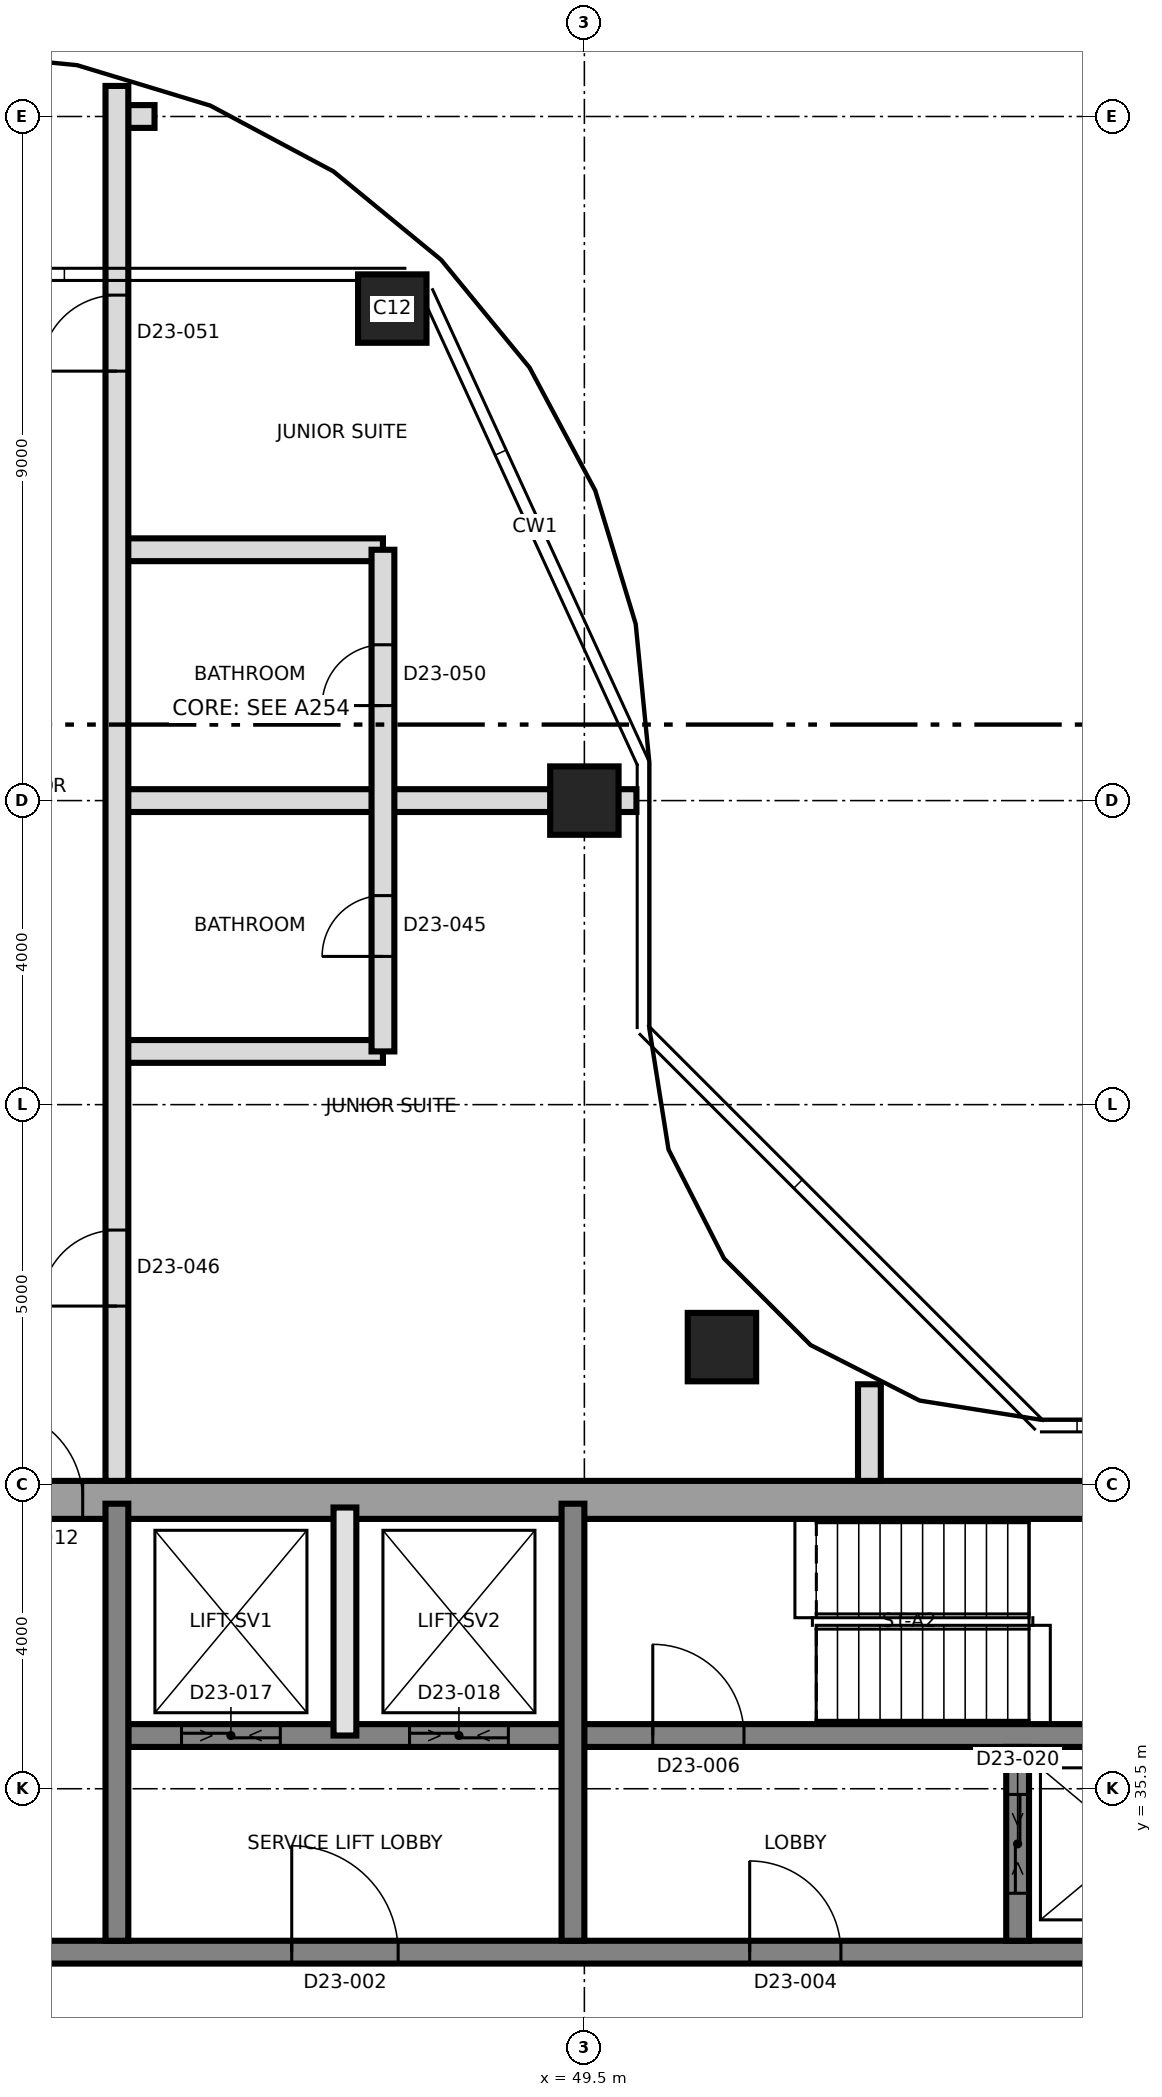
"""IFC4 building model, lengths in metres.
Left out: names, types, materials, properties, quantities, classifications, styles, units other than length and angle.
Written with IfcOpenShell. Run it as: python <this file> out.ifc"""

import sys

from ifc_helpers import new_model, si_unit, direction, frame, frame_2d, origin, origin_2d, place, context, subcontext, project, spatial, rectangle, extrude, element, fill, save


model = new_model("IFC4")
c1 = context("Model", 3, precision=1e-05, world=origin(), true_north=direction((0.0, 1.0)))
c2 = subcontext(c1, "Body", "Model", "MODEL_VIEW")
j1 = project(units=[si_unit("LENGTHUNIT", "METRE"), si_unit("PLANEANGLEUNIT", "RADIAN")], contexts=[c1])
p1 = place(None, origin())
s1 = spatial("IfcSite", under=j1, at=p1, CompositionType="ELEMENT")
p2 = place(p1, origin())
s2 = spatial("IfcBuilding", under=s1, at=p2, CompositionType="ELEMENT")
p3 = place(p2, frame((0.0, 0.0, 206.9)))
s3 = spatial("IfcBuildingStorey", under=s2, at=p3, CompositionType="ELEMENT", Elevation=206.9)
p4 = place(p3, frame((31.25, 39.3, 0.0), z_axis=(0.0, 0.0, 1.0), x_axis=(1.0, 0.0, 0.0)))
e1 = element("IfcWall", 1, at=p4, inside=s3, PredefinedType="SHEAR", context=c2, shape_type="SweptSolid", body=[
    extrude(rectangle(XDim=27.0, YDim=0.5, at=frame_2d((13.5, 0.0))), origin(), (0.0, 0.0, 1.0), 3.7),
])
p5 = place(p4, frame((10.45, 0.0, 0.0)))
e2 = element("IfcOpeningElement", 2, at=p5, cuts=e1, PredefinedType="OPENING", context=c2, shape_type="SweptSolid", body=[
    extrude(rectangle(XDim=1.2, YDim=2.1, at=frame_2d((0.6, 1.05))), frame((0.0, 0.26, 0.0), z_axis=(0.0, -1.0, 0.0), x_axis=(1.0, 0.0, 0.0)), (0.0, 0.0, 1.0), 0.52),
])
p6 = place(p3, frame((31.75, 33.35, 0.0), z_axis=(0.0, 0.0, 1.0), x_axis=(1.0, 0.0, 0.0)))
e3 = element("IfcWall", 3, at=p6, inside=s3, PredefinedType="SHEAR", context=c2, shape_type="SweptSolid", body=[
    extrude(rectangle(XDim=26.5, YDim=0.3, at=frame_2d((13.25, 0.0))), origin(), (0.0, 0.0, 1.0), 3.7),
])
p7 = place(p6, frame((13.9, 0.0, 0.0)))
e4 = element("IfcOpeningElement", 4, at=p7, cuts=e3, PredefinedType="OPENING", context=c2, shape_type="SweptSolid", body=[
    extrude(rectangle(XDim=1.4, YDim=2.1, at=frame_2d((0.7, 1.05))), frame((0.0, 0.16, 0.0), z_axis=(0.0, -1.0, 0.0), x_axis=(1.0, 0.0, 0.0)), (0.0, 0.0, 1.0), 0.32),
])
p8 = place(p6, frame((5.375, 0.0, 0.0)))
e5 = element("IfcOpeningElement", 5, at=p8, cuts=e3, PredefinedType="OPENING", context=c2, shape_type="SweptSolid", body=[
    extrude(rectangle(XDim=1.2, YDim=2.1, at=frame_2d((0.6, 1.05))), frame((0.0, 0.16, 0.0), z_axis=(0.0, -1.0, 0.0), x_axis=(1.0, 0.0, 0.0)), (0.0, 0.0, 1.0), 0.32),
])
p9 = place(p6, frame((19.925, 0.0, 0.0)))
e6 = element("IfcOpeningElement", 6, at=p9, cuts=e3, PredefinedType="OPENING", context=c2, shape_type="SweptSolid", body=[
    extrude(rectangle(XDim=1.2, YDim=2.1, at=frame_2d((0.6, 1.05))), frame((0.0, 0.16, 0.0), z_axis=(0.0, -1.0, 0.0), x_axis=(1.0, 0.0, 0.0)), (0.0, 0.0, 1.0), 0.32),
])
p10 = place(p3, frame((43.5, 36.2, 0.0), z_axis=(0.0, 0.0, 1.0), x_axis=(1.0, 0.0, 0.0)))
e7 = element("IfcWall", 7, at=p10, inside=s3, PredefinedType="SHEAR", context=c2, shape_type="SweptSolid", body=[
    extrude(rectangle(XDim=14.75, YDim=0.3, at=frame_2d((7.375, 0.0))), origin(), (0.0, 0.0, 1.0), 3.7),
])
p11 = place(p10, frame((6.9, 0.0, 0.0)))
e8 = element("IfcOpeningElement", 8, at=p11, cuts=e7, PredefinedType="OPENING", context=c2, shape_type="SweptSolid", body=[
    extrude(rectangle(XDim=1.2, YDim=2.1, at=frame_2d((0.6, 1.05))), frame((0.0, 0.16, 0.0), z_axis=(0.0, -1.0, 0.0), x_axis=(1.0, 0.0, 0.0)), (0.0, 0.0, 1.0), 0.32),
])
p12 = place(p10, frame((0.7, 0.0, 0.0)))
e9 = element("IfcOpeningElement", 9, at=p12, cuts=e7, PredefinedType="OPENING", context=c2, shape_type="SweptSolid", body=[
    extrude(rectangle(XDim=1.3, YDim=2.4, at=frame_2d((0.65, 1.2))), frame((0.0, 0.16, 0.0), z_axis=(0.0, -1.0, 0.0), x_axis=(1.0, 0.0, 0.0)), (0.0, 0.0, 1.0), 0.32),
])
p13 = place(p10, frame((3.7, 0.0, 0.0)))
e10 = element("IfcOpeningElement", 10, at=p13, cuts=e7, PredefinedType="OPENING", context=c2, shape_type="SweptSolid", body=[
    extrude(rectangle(XDim=1.3, YDim=2.4, at=frame_2d((0.65, 1.2))), frame((0.0, 0.16, 0.0), z_axis=(0.0, -1.0, 0.0), x_axis=(1.0, 0.0, 0.0)), (0.0, 0.0, 1.0), 0.32),
])
for number, where, z_axis, x_axis in (
    (11, (43.35, 33.5, 0.0), (0.0, 0.0, 1.0), (0.0, 1.0, 0.0)),
    (12, (49.35, 33.5, 0.0), (0.0, 0.0, 1.0), (0.0, 1.0, 0.0)),
):
    element("IfcWall", number, at=place(p3, frame(where, z_axis=z_axis, x_axis=x_axis)), inside=s3, PredefinedType="SHEAR", context=c2, shape_type="SweptSolid", body=[
        extrude(rectangle(XDim=5.75, YDim=0.3, at=frame_2d((2.875, 0.0))), origin(), (0.0, 0.0, 1.0), 3.7),
    ])
p14 = place(p3, frame((55.2, 33.5, 0.0), z_axis=(0.0, 0.0, 1.0), x_axis=(0.0, 1.0, 0.0)))
e13 = element("IfcWall", 13, at=p14, inside=s3, PredefinedType="SHEAR", context=c2, shape_type="SweptSolid", body=[
    extrude(rectangle(XDim=2.55, YDim=0.3, at=frame_2d((1.275, 0.0))), origin(), (0.0, 0.0, 1.0), 3.7),
])
p15 = place(p14, frame((0.625, 0.0, 0.0)))
e14 = element("IfcOpeningElement", 14, at=p15, cuts=e13, PredefinedType="OPENING", context=c2, shape_type="SweptSolid", body=[
    extrude(rectangle(XDim=1.3, YDim=2.4, at=frame_2d((0.65, 1.2))), frame((0.0, 0.16, 0.0), z_axis=(0.0, -1.0, 0.0), x_axis=(1.0, 0.0, 0.0)), (0.0, 0.0, 1.0), 0.32),
])
for number, where, z_axis, x_axis in (
    (15, (51.31, 41.31, 0.0), (0.0, 0.0, 1.0), (1.0, 0.0, 0.0)),
    (16, (49.5, 48.5, 0.0), (0.0, 0.0, 1.0), (1.0, 0.0, 0.0)),
    (17, (46.973, 54.973, 0.0), (0.0, 0.0, 1.0), (1.0, 0.0, 0.0)),
):
    element("IfcColumn", number, at=place(p3, frame(where, z_axis=z_axis, x_axis=x_axis)), inside=s3, PredefinedType="COLUMN", context=c2, shape_type="SweptSolid", body=[
        extrude(rectangle(XDim=0.9, YDim=0.9, at=origin_2d()), origin(), (0.0, 0.0, 1.0), 3.7),
    ])
p16 = place(p3, frame((46.35, 36.2, 0.0), z_axis=(0.0, 0.0, 1.0), x_axis=(0.0, 1.0, 0.0)))
e18 = element("IfcWall", 18, at=p16, inside=s3, PredefinedType="SOLIDWALL", context=c2, shape_type="SweptSolid", body=[
    extrude(rectangle(XDim=3.0, YDim=0.3, at=frame_2d((1.5, 0.0))), origin(), (0.0, 0.0, 1.0), 3.4),
])
p17 = place(p3, frame((43.35, 45.2, 0.0), z_axis=(0.0, 0.0, 1.0), x_axis=(1.0, 0.0, 0.0)))
e19 = element("IfcWall", 19, at=p17, inside=s3, PredefinedType="PARTITIONING", context=c2, shape_type="SweptSolid", body=[
    extrude(rectangle(XDim=3.5, YDim=0.3, at=frame_2d((1.75, 0.0))), origin(), (0.0, 0.0, 1.0), 3.4),
])
p18 = place(p3, frame((43.35, 48.5, 0.0), z_axis=(0.0, 0.0, 1.0), x_axis=(1.0, 0.0, 0.0)))
e20 = element("IfcWall", 20, at=p18, inside=s3, PredefinedType="PARTITIONING", context=c2, shape_type="SweptSolid", body=[
    extrude(rectangle(XDim=6.835, YDim=0.3, at=frame_2d((3.417, 0.0))), origin(), (0.0, 0.0, 1.0), 3.4),
])
p19 = place(p3, frame((43.35, 51.8, 0.0), z_axis=(0.0, 0.0, 1.0), x_axis=(1.0, 0.0, 0.0)))
e21 = element("IfcWall", 21, at=p19, inside=s3, PredefinedType="PARTITIONING", context=c2, shape_type="SweptSolid", body=[
    extrude(rectangle(XDim=3.5, YDim=0.3, at=frame_2d((1.75, 0.0))), origin(), (0.0, 0.0, 1.0), 3.4),
])
p20 = place(p3, frame((43.498, 57.5, 0.0), z_axis=(0.0, 0.0, 1.0), x_axis=(1.0, 0.0, 0.0)))
e22 = element("IfcWall", 22, at=p20, inside=s3, PredefinedType="PARTITIONING", context=c2, shape_type="SweptSolid", body=[
    extrude(rectangle(XDim=0.347, YDim=0.3, at=frame_2d((0.173, 0.0))), origin(), (0.0, 0.0, 1.0), 3.4),
])
p21 = place(p3, frame((43.35, 39.55, 0.0), z_axis=(0.0, 0.0, 1.0), x_axis=(0.0, 1.0, 0.0)))
e23 = element("IfcWall", 23, at=p21, inside=s3, PredefinedType="PARTITIONING", context=c2, shape_type="SweptSolid", body=[
    extrude(rectangle(XDim=18.352, YDim=0.3, at=frame_2d((9.176, 0.0))), origin(), (0.0, 0.0, 1.0), 3.4),
])
p22 = place(p21, frame((2.3, 0.0, 0.0)))
e24 = element("IfcOpeningElement", 24, at=p22, cuts=e23, PredefinedType="OPENING", context=c2, shape_type="SweptSolid", body=[
    extrude(rectangle(XDim=1.0, YDim=2.4, at=frame_2d((0.5, 1.2))), frame((0.0, 0.16, 0.0), z_axis=(0.0, -1.0, 0.0), x_axis=(1.0, 0.0, 0.0)), (0.0, 0.0, 1.0), 0.32),
])
p23 = place(p21, frame((14.6, 0.0, 0.0)))
e25 = element("IfcOpeningElement", 25, at=p23, cuts=e23, PredefinedType="OPENING", context=c2, shape_type="SweptSolid", body=[
    extrude(rectangle(XDim=1.0, YDim=2.4, at=frame_2d((0.5, 1.2))), frame((0.0, 0.16, 0.0), z_axis=(0.0, -1.0, 0.0), x_axis=(1.0, 0.0, 0.0)), (0.0, 0.0, 1.0), 0.32),
])
p24 = place(p3, frame((46.85, 45.2, 0.0), z_axis=(0.0, 0.0, 1.0), x_axis=(0.0, 1.0, 0.0)))
e26 = element("IfcWall", 26, at=p24, inside=s3, PredefinedType="PARTITIONING", context=c2, shape_type="SweptSolid", body=[
    extrude(rectangle(XDim=6.6, YDim=0.3, at=frame_2d((3.3, 0.0))), origin(), (0.0, 0.0, 1.0), 3.4),
])
p25 = place(p24, frame((1.25, 0.0, 0.0)))
e27 = element("IfcOpeningElement", 27, at=p25, cuts=e26, PredefinedType="OPENING", context=c2, shape_type="SweptSolid", body=[
    extrude(rectangle(XDim=0.8, YDim=2.1, at=frame_2d((0.4, 1.05))), frame((0.0, 0.16, 0.0), z_axis=(0.0, -1.0, 0.0), x_axis=(1.0, 0.0, 0.0)), (0.0, 0.0, 1.0), 0.32),
])
p26 = place(p24, frame((4.55, 0.0, 0.0)))
e28 = element("IfcOpeningElement", 28, at=p26, cuts=e26, PredefinedType="OPENING", context=c2, shape_type="SweptSolid", body=[
    extrude(rectangle(XDim=0.8, YDim=2.1, at=frame_2d((0.4, 1.05))), frame((0.0, 0.16, 0.0), z_axis=(0.0, -1.0, 0.0), x_axis=(1.0, 0.0, 0.0)), (0.0, 0.0, 1.0), 0.32),
])
p27 = place(p3, frame((53.25, 39.55, 0.0), z_axis=(0.0, 0.0, 1.0), x_axis=(0.0, 1.0, 0.0)))
e29 = element("IfcWall", 29, at=p27, inside=s3, PredefinedType="PARTITIONING", context=c2, shape_type="SweptSolid", body=[
    extrude(rectangle(XDim=1.271, YDim=0.3, at=frame_2d((0.635, 0.0))), origin(), (0.0, 0.0, 1.0), 3.4),
])
p28 = place(p7, origin())
e30 = element("IfcDoor", 30, at=p28, inside=s3, OperationType="SINGLE_SWING_RIGHT", PredefinedType="DOOR", context=c2, shape_type="SweptSolid", body=[
    extrude(rectangle(XDim=1.4, YDim=2.1, at=frame_2d((0.7, 1.05))), frame((0.0, 0.025, 0.0), z_axis=(0.0, -1.0, 0.0), x_axis=(1.0, 0.0, 0.0)), (0.0, 0.0, 1.0), 0.05),
])
fill(e4, e30)
p29 = place(p9, origin())
e31 = element("IfcDoor", 31, at=p29, inside=s3, OperationType="SINGLE_SWING_RIGHT", PredefinedType="DOOR", context=c2, shape_type="SweptSolid", body=[
    extrude(rectangle(XDim=1.2, YDim=2.1, at=frame_2d((0.6, 1.05))), frame((0.0, 0.025, 0.0), z_axis=(0.0, -1.0, 0.0), x_axis=(1.0, 0.0, 0.0)), (0.0, 0.0, 1.0), 0.05),
])
fill(e6, e31)
p30 = place(p11, origin())
e32 = element("IfcDoor", 32, at=p30, inside=s3, OperationType="SINGLE_SWING_LEFT", PredefinedType="DOOR", context=c2, shape_type="SweptSolid", body=[
    extrude(rectangle(XDim=1.2, YDim=2.1, at=frame_2d((0.6, 1.05))), frame((0.0, 0.025, 0.0), z_axis=(0.0, -1.0, 0.0), x_axis=(1.0, 0.0, 0.0)), (0.0, 0.0, 1.0), 0.05),
])
fill(e8, e32)
p31 = place(p5, origin())
e33 = element("IfcDoor", 33, at=p31, inside=s3, OperationType="SINGLE_SWING_RIGHT", PredefinedType="DOOR", context=c2, shape_type="SweptSolid", body=[
    extrude(rectangle(XDim=1.2, YDim=2.1, at=frame_2d((0.6, 1.05))), frame((0.0, 0.025, 0.0), z_axis=(0.0, -1.0, 0.0), x_axis=(1.0, 0.0, 0.0)), (0.0, 0.0, 1.0), 0.05),
])
fill(e2, e33)
p32 = place(p12, origin())
e34 = element("IfcDoor", 34, at=p32, inside=s3, OperationType="SLIDING_TO_LEFT", PredefinedType="DOOR", context=c2, shape_type="SweptSolid", body=[
    extrude(rectangle(XDim=1.3, YDim=2.4, at=frame_2d((0.65, 1.2))), frame((0.0, 0.025, 0.0), z_axis=(0.0, -1.0, 0.0), x_axis=(1.0, 0.0, 0.0)), (0.0, 0.0, 1.0), 0.05),
])
fill(e9, e34)
p33 = place(p13, origin())
e35 = element("IfcDoor", 35, at=p33, inside=s3, OperationType="SLIDING_TO_LEFT", PredefinedType="DOOR", context=c2, shape_type="SweptSolid", body=[
    extrude(rectangle(XDim=1.3, YDim=2.4, at=frame_2d((0.65, 1.2))), frame((0.0, 0.025, 0.0), z_axis=(0.0, -1.0, 0.0), x_axis=(1.0, 0.0, 0.0)), (0.0, 0.0, 1.0), 0.05),
])
fill(e10, e35)
p34 = place(p15, origin())
e36 = element("IfcDoor", 36, at=p34, inside=s3, OperationType="SLIDING_TO_LEFT", PredefinedType="DOOR", context=c2, shape_type="SweptSolid", body=[
    extrude(rectangle(XDim=1.3, YDim=2.4, at=frame_2d((0.65, 1.2))), frame((0.0, 0.025, 0.0), z_axis=(0.0, -1.0, 0.0), x_axis=(1.0, 0.0, 0.0)), (0.0, 0.0, 1.0), 0.05),
])
fill(e14, e36)
p35 = place(p25, origin())
e37 = element("IfcDoor", 37, at=p35, inside=s3, OperationType="SINGLE_SWING_LEFT", PredefinedType="DOOR", context=c2, shape_type="SweptSolid", body=[
    extrude(rectangle(XDim=0.8, YDim=2.1, at=frame_2d((0.4, 1.05))), frame((0.0, 0.025, 0.0), z_axis=(0.0, -1.0, 0.0), x_axis=(1.0, 0.0, 0.0)), (0.0, 0.0, 1.0), 0.05),
])
fill(e27, e37)
p36 = place(p22, origin())
e38 = element("IfcDoor", 38, at=p36, inside=s3, OperationType="SINGLE_SWING_LEFT", PredefinedType="DOOR", context=c2, shape_type="SweptSolid", body=[
    extrude(rectangle(XDim=1.0, YDim=2.4, at=frame_2d((0.5, 1.2))), frame((0.0, 0.025, 0.0), z_axis=(0.0, -1.0, 0.0), x_axis=(1.0, 0.0, 0.0)), (0.0, 0.0, 1.0), 0.05),
])
fill(e24, e38)
p37 = place(p26, origin())
e39 = element("IfcDoor", 39, at=p37, inside=s3, OperationType="SINGLE_SWING_LEFT", PredefinedType="DOOR", context=c2, shape_type="SweptSolid", body=[
    extrude(rectangle(XDim=0.8, YDim=2.1, at=frame_2d((0.4, 1.05))), frame((0.0, 0.025, 0.0), z_axis=(0.0, -1.0, 0.0), x_axis=(1.0, 0.0, 0.0)), (0.0, 0.0, 1.0), 0.05),
])
fill(e28, e39)
p38 = place(p23, origin())
e40 = element("IfcDoor", 40, at=p38, inside=s3, OperationType="SINGLE_SWING_RIGHT", PredefinedType="DOOR", context=c2, shape_type="SweptSolid", body=[
    extrude(rectangle(XDim=1.0, YDim=2.4, at=frame_2d((0.5, 1.2))), frame((0.0, 0.025, 0.0), z_axis=(0.0, -1.0, 0.0), x_axis=(1.0, 0.0, 0.0)), (0.0, 0.0, 1.0), 0.05),
])
fill(e25, e40)
save(model, sys.argv[1])
